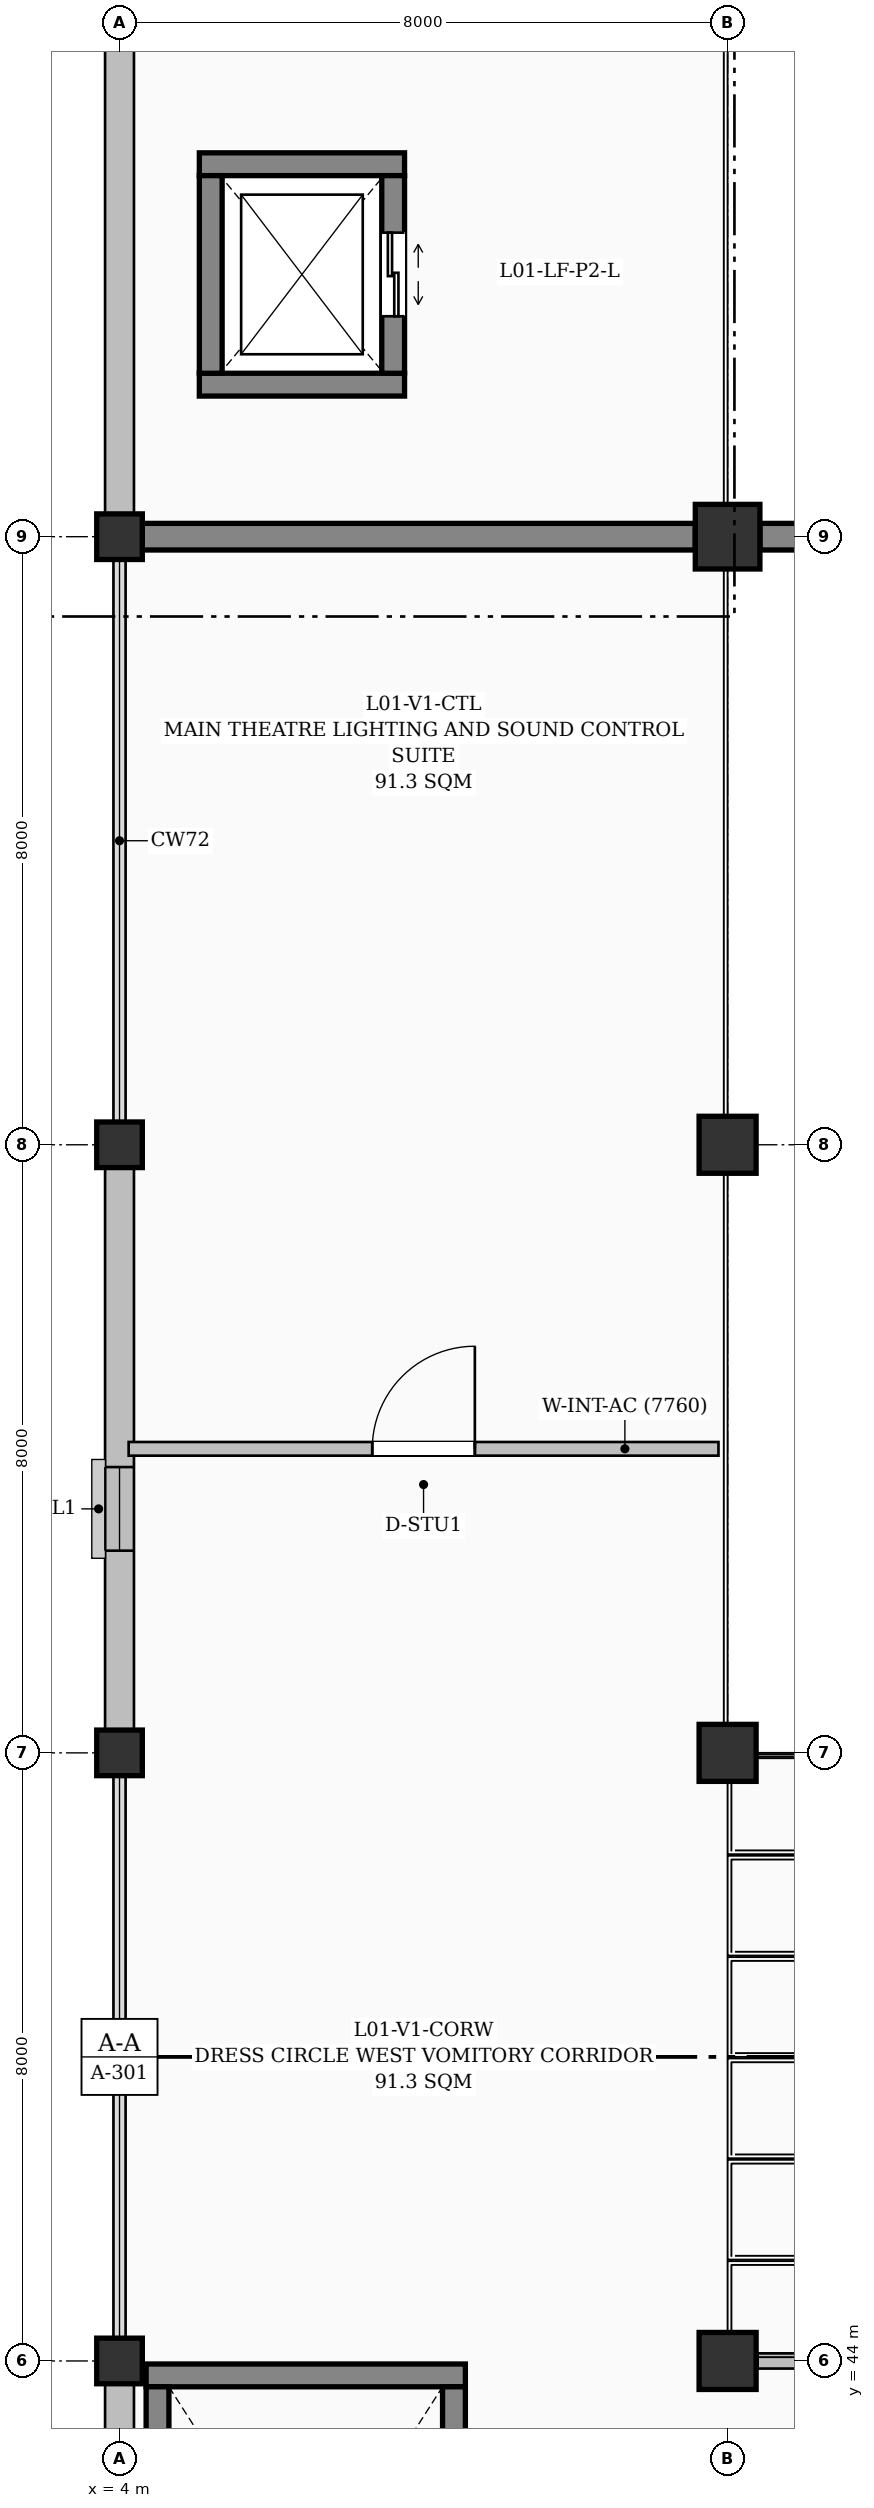
"""IFC4 building model, lengths in metres.
Left out: names, types, materials, properties, quantities, classifications, styles, units other than length and angle.
Written with IfcOpenShell. Run it as: python <this file> out.ifc"""

import sys

from ifc_helpers import new_model, si_unit, direction, frame, frame_2d, origin, origin_2d, place, context, subcontext, project, spatial, rectangle, extrude, element, fill, save


model = new_model("IFC4")
c1 = context("Model", 3, precision=1e-05, world=origin(), true_north=direction((0.0, 1.0)))
c2 = subcontext(c1, "Body", "Model", "MODEL_VIEW")
j1 = project(units=[si_unit("LENGTHUNIT", "METRE"), si_unit("PLANEANGLEUNIT", "RADIAN")], contexts=[c1])
p1 = place(None, origin())
s1 = spatial("IfcSite", under=j1, at=p1, CompositionType="ELEMENT")
p2 = place(p1, origin())
s2 = spatial("IfcBuilding", under=s1, at=p2, CompositionType="ELEMENT")
p3 = place(p2, frame((0.0, 0.0, 4.8)))
s3 = spatial("IfcBuildingStorey", under=s2, at=p3, CompositionType="ELEMENT", Elevation=4.8)
for number, where, z_axis, x_axis in (
    (1, (4.0, 44.0, 0.0), (0.0, 0.0, 1.0), (1.0, 0.0, 0.0)),
    (2, (4.0, 52.0, 0.0), (0.0, 0.0, 1.0), (1.0, 0.0, 0.0)),
    (3, (4.0, 60.0, 0.0), (0.0, 0.0, 1.0), (1.0, 0.0, 0.0)),
    (4, (4.0, 68.0, 0.0), (0.0, 0.0, 1.0), (1.0, 0.0, 0.0)),
):
    element("IfcColumn", number, at=place(p3, frame(where, z_axis=z_axis, x_axis=x_axis)), inside=s3, PredefinedType="COLUMN", context=c2, shape_type="SweptSolid", body=[
        extrude(rectangle(XDim=0.6, YDim=0.6, at=origin_2d()), origin(), (0.0, 0.0, 1.0), 4.5),
    ])
for number, where, z_axis, x_axis in (
    (5, (12.0, 44.0, 0.0), (0.0, 0.0, 1.0), (1.0, 0.0, 0.0)),
    (6, (12.0, 52.0, 0.0), (0.0, 0.0, 1.0), (1.0, 0.0, 0.0)),
    (7, (12.0, 60.0, 0.0), (0.0, 0.0, 1.0), (1.0, 0.0, 0.0)),
):
    element("IfcColumn", number, at=place(p3, frame(where, z_axis=z_axis, x_axis=x_axis)), inside=s3, PredefinedType="COLUMN", context=c2, shape_type="SweptSolid", body=[
        extrude(rectangle(XDim=0.75, YDim=0.75, at=origin_2d()), origin(), (0.0, 0.0, 1.0), 4.5),
    ])
p4 = place(p3, frame((12.0, 68.0, 0.0), z_axis=(0.0, 0.0, 1.0), x_axis=(1.0, 0.0, 0.0)))
e8 = element("IfcColumn", 8, at=p4, inside=s3, PredefinedType="COLUMN", context=c2, shape_type="SweptSolid", body=[
    extrude(rectangle(XDim=0.85, YDim=0.85, at=origin_2d()), origin(), (0.0, 0.0, 1.0), 4.5),
])
p5 = place(p3, frame((4.3, 68.0, 0.0), z_axis=(0.0, 0.0, 1.0), x_axis=(1.0, 0.0, 0.0)))
e9 = element("IfcWall", 9, at=p5, inside=s3, PredefinedType="SHEAR", context=c2, shape_type="SweptSolid", body=[
    extrude(rectangle(XDim=7.275, YDim=0.35, at=frame_2d((3.637, 0.0))), origin(), (0.0, 0.0, 1.0), 4.25),
])
p6 = place(p3, frame((12.425, 68.0, 0.0), z_axis=(0.0, 0.0, 1.0), x_axis=(1.0, 0.0, 0.0)))
e10 = element("IfcWall", 10, at=p6, inside=s3, PredefinedType="SHEAR", context=c2, shape_type="SweptSolid", body=[
    extrude(rectangle(XDim=7.15, YDim=0.35, at=frame_2d((3.575, 0.0))), origin(), (0.0, 0.0, 1.0), 4.25),
])
p7 = place(p3, frame((4.0, 36.3, 0.0), z_axis=(0.0, 0.0, 1.0), x_axis=(0.0, 1.0, 0.0)))
e11 = element("IfcWall", 11, at=p7, inside=s3, PredefinedType="SOLIDWALL", context=c2, shape_type="SweptSolid", body=[
    extrude(rectangle(XDim=7.4, YDim=0.38, at=frame_2d((3.7, 0.0))), origin(), (0.0, 0.0, 1.0), 3.935),
])
p8 = place(p7, frame((3.2, 0.0, 0.95)))
e12 = element("IfcOpeningElement", 12, at=p8, cuts=e11, PredefinedType="OPENING", context=c2, shape_type="SweptSolid", body=[
    extrude(rectangle(XDim=1.0, YDim=1.4, at=frame_2d((0.5, 0.7))), frame((0.0, 0.2, 0.0), z_axis=(0.0, -1.0, 0.0), x_axis=(1.0, 0.0, 0.0)), (0.0, 0.0, 1.0), 0.4),
])
p9 = place(p3, frame((4.0, 52.3, 0.0), z_axis=(0.0, 0.0, 1.0), x_axis=(0.0, 1.0, 0.0)))
e13 = element("IfcWall", 13, at=p9, inside=s3, PredefinedType="SOLIDWALL", context=c2, shape_type="SweptSolid", body=[
    extrude(rectangle(XDim=7.4, YDim=0.38, at=frame_2d((3.7, 0.0))), origin(), (0.0, 0.0, 1.0), 3.685),
])
p10 = place(p9, frame((2.36, 0.0, 0.95)))
e14 = element("IfcOpeningElement", 14, at=p10, cuts=e13, PredefinedType="OPENING", context=c2, shape_type="SweptSolid", body=[
    extrude(rectangle(XDim=1.1, YDim=2.0, at=frame_2d((0.55, 1.0))), frame((0.0, 0.2, 0.0), z_axis=(0.0, -1.0, 0.0), x_axis=(1.0, 0.0, 0.0)), (0.0, 0.0, 1.0), 0.4),
])
p11 = place(p3, frame((4.0, 68.3, 0.0), z_axis=(0.0, 0.0, 1.0), x_axis=(0.0, 1.0, 0.0)))
e15 = element("IfcWall", 15, at=p11, inside=s3, PredefinedType="SOLIDWALL", context=c2, shape_type="SweptSolid", body=[
    extrude(rectangle(XDim=7.4, YDim=0.38, at=frame_2d((3.7, 0.0))), origin(), (0.0, 0.0, 1.0), 4.035),
])
p12 = place(p3, frame((8.55, 43.81, 0.0), z_axis=(0.0, 0.0, 1.0), x_axis=(-1.0, 0.0, 0.0)))
e16 = element("IfcWall", 16, at=p12, inside=s3, PredefinedType="SHEAR", context=c2, shape_type="SweptSolid", body=[
    extrude(rectangle(XDim=4.2, YDim=0.3, at=frame_2d((2.1, 0.0))), origin(), (0.0, 0.0, 1.0), 4.25),
])
p13 = place(p3, frame((4.5, 36.34, 0.0), z_axis=(0.0, 0.0, 1.0), x_axis=(0.0, 1.0, 0.0)))
e17 = element("IfcWall", 17, at=p13, inside=s3, PredefinedType="SHEAR", context=c2, shape_type="SweptSolid", body=[
    extrude(rectangle(XDim=7.32, YDim=0.3, at=frame_2d((3.66, 0.0))), origin(), (0.0, 0.0, 1.0), 4.25),
])
p14 = place(p3, frame((8.4, 36.34, 0.0), z_axis=(0.0, 0.0, 1.0), x_axis=(0.0, 1.0, 0.0)))
e18 = element("IfcWall", 18, at=p14, inside=s3, PredefinedType="SHEAR", context=c2, shape_type="SweptSolid", body=[
    extrude(rectangle(XDim=7.32, YDim=0.3, at=frame_2d((3.66, 0.0))), origin(), (0.0, 0.0, 1.0), 4.25),
])
p15 = place(p14, frame((0.35, 0.0, 0.0)))
e19 = element("IfcOpeningElement", 19, at=p15, cuts=e18, PredefinedType="OPENING", context=c2, shape_type="SweptSolid", body=[
    extrude(rectangle(XDim=1.2, YDim=2.15, at=frame_2d((0.6, 1.075))), frame((0.0, 0.16, 0.0), z_axis=(0.0, -1.0, 0.0), x_axis=(1.0, 0.0, 0.0)), (0.0, 0.0, 1.0), 0.32),
])
for number, where, z_axis, x_axis in (
    (20, (5.05, 70.0, 0.0), (0.0, 0.0, 1.0), (1.0, 0.0, 0.0)),
    (21, (7.75, 72.9, 0.0), (0.0, 0.0, 1.0), (-1.0, 0.0, 0.0)),
):
    element("IfcWall", number, at=place(p3, frame(where, z_axis=z_axis, x_axis=x_axis)), inside=s3, PredefinedType="SHEAR", context=c2, shape_type="SweptSolid", body=[
        extrude(rectangle(XDim=2.7, YDim=0.3, at=frame_2d((1.35, 0.0))), origin(), (0.0, 0.0, 1.0), 4.25),
    ])
p16 = place(p3, frame((5.2, 70.15, 0.0), z_axis=(0.0, 0.0, 1.0), x_axis=(0.0, 1.0, 0.0)))
e22 = element("IfcWall", 22, at=p16, inside=s3, PredefinedType="SHEAR", context=c2, shape_type="SweptSolid", body=[
    extrude(rectangle(XDim=2.6, YDim=0.3, at=frame_2d((1.3, 0.0))), origin(), (0.0, 0.0, 1.0), 4.25),
])
p17 = place(p3, frame((7.6, 72.75, 0.0), z_axis=(0.0, 0.0, 1.0), x_axis=(0.0, -1.0, 0.0)))
e23 = element("IfcWall", 23, at=p17, inside=s3, PredefinedType="SHEAR", context=c2, shape_type="SweptSolid", body=[
    extrude(rectangle(XDim=2.6, YDim=0.3, at=frame_2d((1.3, 0.0))), origin(), (0.0, 0.0, 1.0), 4.25),
])
p18 = place(p17, frame((0.75, 0.0, 0.0)))
e24 = element("IfcOpeningElement", 24, at=p18, cuts=e23, PredefinedType="OPENING", context=c2, shape_type="SweptSolid", body=[
    extrude(rectangle(XDim=1.1, YDim=2.15, at=frame_2d((0.55, 1.075))), frame((0.0, 0.16, 0.0), z_axis=(0.0, -1.0, 0.0), x_axis=(1.0, 0.0, 0.0)), (0.0, 0.0, 1.0), 0.32),
])
p19 = place(p3, frame((12.395, 44.0, 0.0), z_axis=(0.0, 0.0, 1.0), x_axis=(1.0, 0.0, 0.0)))
e25 = element("IfcWall", 25, at=p19, inside=s3, PredefinedType="PARTITIONING", context=c2, shape_type="SweptSolid", body=[
    extrude(rectangle(XDim=31.21, YDim=0.2, at=frame_2d((15.605, 0.0))), origin(), (0.0, 0.0, 1.0), 3.385),
])
p20 = place(p19, frame((10.96, 0.0, 0.0)))
e26 = element("IfcOpeningElement", 26, at=p20, cuts=e25, PredefinedType="OPENING", context=c2, shape_type="SweptSolid", body=[
    extrude(rectangle(XDim=1.8, YDim=2.35, at=frame_2d((0.9, 1.175))), frame((0.0, 0.11, 0.0), z_axis=(0.0, -1.0, 0.0), x_axis=(1.0, 0.0, 0.0)), (0.0, 0.0, 1.0), 0.22),
])
p21 = place(p3, frame((4.12, 56.0, 0.0), z_axis=(0.0, 0.0, 1.0), x_axis=(1.0, 0.0, 0.0)))
e27 = element("IfcWall", 27, at=p21, inside=s3, PredefinedType="PARTITIONING", context=c2, shape_type="SweptSolid", body=[
    extrude(rectangle(XDim=7.76, YDim=0.18, at=frame_2d((3.88, 0.0))), origin(), (0.0, 0.0, 1.0), 4.25),
])
p22 = place(p21, frame((3.205, 0.0, 0.0)))
e28 = element("IfcOpeningElement", 28, at=p22, cuts=e27, PredefinedType="OPENING", context=c2, shape_type="SweptSolid", body=[
    extrude(rectangle(XDim=1.35, YDim=2.2, at=frame_2d((0.675, 1.1))), frame((0.0, 0.1, 0.0), z_axis=(0.0, -1.0, 0.0), x_axis=(1.0, 0.0, 0.0)), (0.0, 0.0, 1.0), 0.2),
])
p23 = place(p10, origin())
e29 = element("IfcWindow", 29, at=p23, inside=s3, PartitioningType="SINGLE_PANEL", PredefinedType="WINDOW", context=c2, shape_type="SweptSolid", body=[
    extrude(rectangle(XDim=1.1, YDim=2.0, at=frame_2d((0.55, 1.0))), frame((0.0, 0.03, 0.0), z_axis=(0.0, -1.0, 0.0), x_axis=(1.0, 0.0, 0.0)), (0.0, 0.0, 1.0), 0.06),
])
fill(e14, e29)
p24 = place(p18, origin())
e30 = element("IfcDoor", 30, at=p24, inside=s3, OperationType="DOUBLE_DOOR_SLIDING", PredefinedType="DOOR", context=c2, shape_type="SweptSolid", body=[
    extrude(rectangle(XDim=1.1, YDim=2.15, at=frame_2d((0.55, 1.075))), frame((0.0, 0.025, 0.0), z_axis=(0.0, -1.0, 0.0), x_axis=(1.0, 0.0, 0.0)), (0.0, 0.0, 1.0), 0.05),
])
fill(e24, e30)
p25 = place(p22, origin())
e31 = element("IfcDoor", 31, at=p25, inside=s3, OperationType="SINGLE_SWING_RIGHT", PredefinedType="DOOR", context=c2, shape_type="SweptSolid", body=[
    extrude(rectangle(XDim=1.35, YDim=2.2, at=frame_2d((0.675, 1.1))), frame((0.0, 0.025, 0.0), z_axis=(0.0, -1.0, 0.0), x_axis=(1.0, 0.0, 0.0)), (0.0, 0.0, 1.0), 0.05),
])
fill(e28, e31)
save(model, sys.argv[1])
